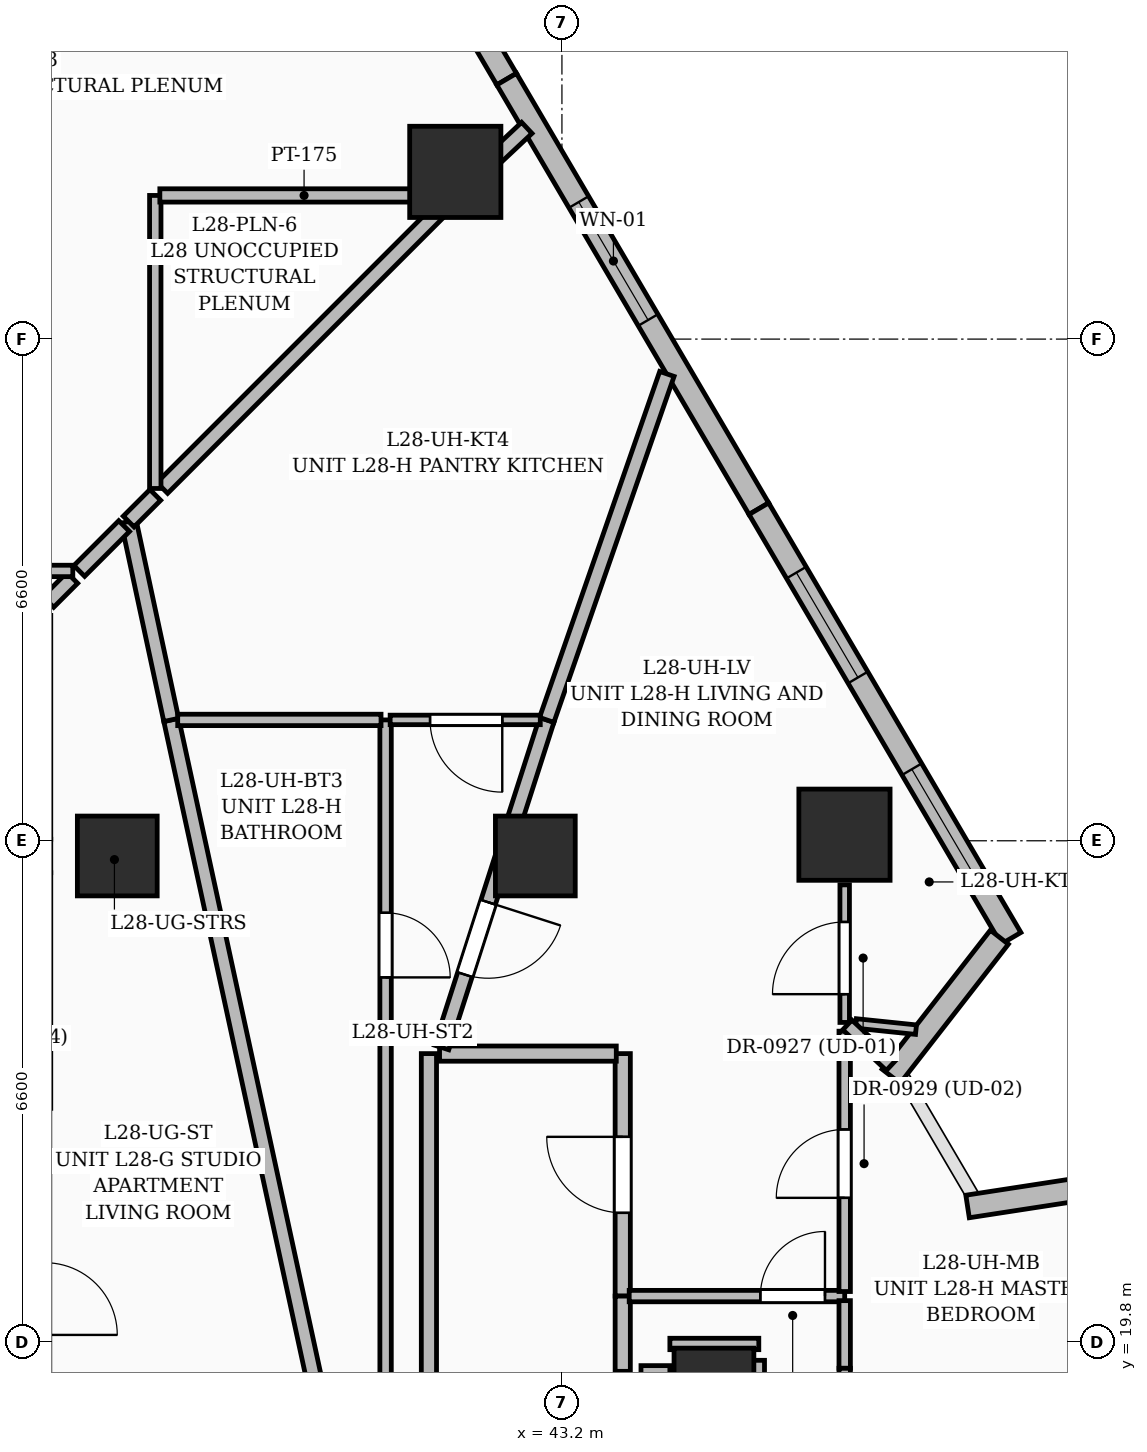
"""IFC4 building model, lengths in metres.
Left out: names, types, materials, properties, quantities, classifications, styles, units other than length and angle.
Written with IfcOpenShell. Run it as: python <this file> out.ifc"""

import sys

from ifc_helpers import new_model, si_unit, direction, frame, frame_2d, origin, origin_2d, place, context, subcontext, project, spatial, rectangle, extrude, element, fill, save


model = new_model("IFC4")
c1 = context("Model", 3, precision=1e-05, world=origin(), true_north=direction((0.0, 1.0)))
c2 = subcontext(c1, "Body", "Model", "MODEL_VIEW")
j1 = project(units=[si_unit("LENGTHUNIT", "METRE"), si_unit("PLANEANGLEUNIT", "RADIAN")], contexts=[c1])
p1 = place(None, origin())
s1 = spatial("IfcSite", under=j1, at=p1, CompositionType="ELEMENT")
p2 = place(p1, origin())
s2 = spatial("IfcBuilding", under=s1, at=p2, CompositionType="ELEMENT")
p3 = place(p2, frame((0.0, 0.0, 114.0)))
s3 = spatial("IfcBuildingStorey", under=s2, at=p3, CompositionType="ELEMENT", Elevation=114.0)
for number, where, z_axis, x_axis in (
    (1, (45.2, 19.2, 0.0), (0.0, 0.0, 1.0), (1.0, 0.0, 0.0)),
    (2, (42.85, 26.2, 0.0), (0.0, 0.0, 1.0), (1.0, 0.0, 0.0)),
    (3, (37.35, 26.2, 0.0), (0.0, 0.0, 1.0), (1.0, 0.0, 0.0)),
):
    element("IfcColumn", number, at=place(p3, frame(where, z_axis=z_axis, x_axis=x_axis)), inside=s3, PredefinedType="COLUMN", context=c2, shape_type="SweptSolid", body=[
        extrude(rectangle(XDim=1.05, YDim=1.05, at=origin_2d()), origin(), (0.0, 0.0, 1.0), 3.6),
    ])
for number, where, z_axis, x_axis in (
    (4, (46.917, 26.48, 0.0), (0.0, 0.0, 1.0), (1.0, 0.0, 0.0)),
    (5, (41.797, 35.2, 0.0), (0.0, 0.0, 1.0), (1.0, 0.0, 0.0)),
):
    element("IfcColumn", number, at=place(p3, frame(where, z_axis=z_axis, x_axis=x_axis)), inside=s3, PredefinedType="COLUMN", context=c2, shape_type="SweptSolid", body=[
        extrude(rectangle(XDim=1.2, YDim=1.2, at=origin_2d()), origin(), (0.0, 0.0, 1.0), 3.6),
    ])
p4 = place(p3, frame((39.443, 41.58, 0.0), z_axis=(0.0, 0.0, 1.0), x_axis=(0.506342397937, -0.862332520581, 0.0)))
e6 = element("IfcWall", 6, at=p4, inside=s3, PredefinedType="SOLIDWALL", context=c2, shape_type="SweptSolid", body=[
    extrude(rectangle(XDim=5.984, YDim=0.3, at=frame_2d((2.992, 0.0))), origin(), (0.0, 0.0, 1.0), 3.35),
])
p5 = place(p4, frame((2.28, 0.0, 0.55)))
e7 = element("IfcOpeningElement", 7, at=p5, cuts=e6, PredefinedType="OPENING", context=c2, shape_type="SweptSolid", body=[
    extrude(rectangle(XDim=2.1, YDim=2.4, at=frame_2d((1.05, 1.2))), frame((0.0, 0.16, 0.0), z_axis=(0.0, -1.0, 0.0), x_axis=(1.0, 0.0, 0.0)), (0.0, 0.0, 1.0), 0.32),
])
p6 = place(p3, frame((42.472, 36.42, 0.0), z_axis=(0.0, 0.0, 1.0), x_axis=(0.506315009763, -0.86234860172, 0.0)))
e8 = element("IfcWall", 8, at=p6, inside=s3, PredefinedType="SOLIDWALL", context=c2, shape_type="SweptSolid", body=[
    extrude(rectangle(XDim=6.553, YDim=0.3, at=frame_2d((3.277, 0.0))), origin(), (0.0, 0.0, 1.0), 3.35),
])
p7 = place(p6, frame((1.875, 0.0, 0.6)))
e9 = element("IfcOpeningElement", 9, at=p7, cuts=e8, PredefinedType="OPENING", context=c2, shape_type="SweptSolid", body=[
    extrude(rectangle(XDim=1.8, YDim=2.1, at=frame_2d((0.9, 1.05))), frame((0.0, 0.16, 0.0), z_axis=(0.0, -1.0, 0.0), x_axis=(1.0, 0.0, 0.0)), (0.0, 0.0, 1.0), 0.32),
])
p8 = place(p3, frame((45.791, 30.769, 0.0), z_axis=(0.0, 0.0, 1.0), x_axis=(0.506326446954, -0.862341886443, 0.0)))
e10 = element("IfcWall", 10, at=p8, inside=s3, PredefinedType="SOLIDWALL", context=c2, shape_type="SweptSolid", body=[
    extrude(rectangle(XDim=6.554, YDim=0.3, at=frame_2d((3.277, 0.0))), origin(), (0.0, 0.0, 1.0), 3.35),
])
p9 = place(p8, frame((0.975, 0.0, 0.55)))
e11 = element("IfcOpeningElement", 11, at=p9, cuts=e10, PredefinedType="OPENING", context=c2, shape_type="SweptSolid", body=[
    extrude(rectangle(XDim=1.6, YDim=2.2, at=frame_2d((0.8, 1.1))), frame((0.0, 0.16, 0.0), z_axis=(0.0, -1.0, 0.0), x_axis=(1.0, 0.0, 0.0)), (0.0, 0.0, 1.0), 0.32),
])
p10 = place(p8, frame((3.975, 0.0, 0.55)))
e12 = element("IfcOpeningElement", 12, at=p10, cuts=e10, PredefinedType="OPENING", context=c2, shape_type="SweptSolid", body=[
    extrude(rectangle(XDim=1.6, YDim=2.2, at=frame_2d((0.8, 1.1))), frame((0.0, 0.16, 0.0), z_axis=(0.0, -1.0, 0.0), x_axis=(1.0, 0.0, 0.0)), (0.0, 0.0, 1.0), 0.32),
])
p11 = place(p3, frame((48.955, 25.132, 0.0), z_axis=(0.0, 0.0, 1.0), x_axis=(-0.614326980446, -0.789051557946, 0.0)))
e13 = element("IfcWall", 13, at=p11, inside=s3, PredefinedType="SOLIDWALL", context=c2, shape_type="SweptSolid", body=[
    extrude(rectangle(XDim=2.318, YDim=0.3, at=frame_2d((1.159, 0.0))), origin(), (0.0, 0.0, 1.0), 2.575),
])
p12 = place(p3, frame((48.537, 21.589, 0.0), z_axis=(0.0, 0.0, 1.0), x_axis=(0.988351014823, 0.152191561848, 0.0)))
e14 = element("IfcWall", 14, at=p12, inside=s3, PredefinedType="SOLIDWALL", context=c2, shape_type="SweptSolid", body=[
    extrude(rectangle(XDim=2.594, YDim=0.3, at=frame_2d((1.297, 0.0))), origin(), (0.0, 0.0, 1.0), 2.575),
])
p13 = place(p3, frame((44.0, 20.41, 0.0), z_axis=(0.0, 0.0, 1.0), x_axis=(0.0, 1.0, 0.0)))
e15 = element("IfcWall", 15, at=p13, inside=s3, PredefinedType="PARTITIONING", context=c2, shape_type="SweptSolid", body=[
    extrude(rectangle(XDim=3.19, YDim=0.2, at=frame_2d((1.595, 0.0))), origin(), (0.0, 0.0, 1.0), 2.436),
])
p14 = place(p13, frame((1.095, 0.0, 0.0)))
e16 = element("IfcOpeningElement", 16, at=p14, cuts=e15, PredefinedType="OPENING", context=c2, shape_type="SweptSolid", body=[
    extrude(rectangle(XDim=1.0, YDim=2.2, at=frame_2d((0.5, 1.1))), frame((0.0, 0.11, 0.0), z_axis=(0.0, -1.0, 0.0), x_axis=(1.0, 0.0, 0.0)), (0.0, 0.0, 1.0), 0.22),
])
p15 = place(p3, frame((43.915, 23.6, 0.0), z_axis=(0.0, 0.0, 1.0), x_axis=(-1.0, 0.0, 0.0)))
e17 = element("IfcWall", 17, at=p15, inside=s3, PredefinedType="PARTITIONING", context=c2, shape_type="SweptSolid", body=[
    extrude(rectangle(XDim=2.325, YDim=0.2, at=frame_2d((1.163, 0.0))), origin(), (0.0, 0.0, 1.0), 2.436),
])
p16 = place(p3, frame((44.0, 19.42, 0.0), z_axis=(0.0, 0.0, 1.0), x_axis=(0.0, 1.0, 0.0)))
e18 = element("IfcWall", 18, at=p16, inside=s3, PredefinedType="PARTITIONING", context=c2, shape_type="SweptSolid", body=[
    extrude(rectangle(XDim=0.99, YDim=0.2, at=frame_2d((0.495, 0.0))), origin(), (0.0, 0.0, 1.0), 3.35),
])
p17 = place(p3, frame((41.45, 23.6, 0.0), z_axis=(0.0, 0.0, 1.0), x_axis=(0.0, -1.0, 0.0)))
e19 = element("IfcWall", 19, at=p17, inside=s3, PredefinedType="PARTITIONING", context=c2, shape_type="SweptSolid", body=[
    extrude(rectangle(XDim=5.85, YDim=0.2, at=frame_2d((2.925, 0.0))), origin(), (0.0, 0.0, 1.0), 3.35),
])
p18 = place(p3, frame((40.262, 17.833, 0.0), z_axis=(0.0, 0.0, 1.0), x_axis=(-0.211865908249, 0.977298744971, 0.0)))
e20 = element("IfcWall", 20, at=p18, inside=s3, PredefinedType="PARTITIONING", context=c2, shape_type="SweptSolid", body=[
    extrude(rectangle(XDim=10.393, YDim=0.2, at=frame_2d((5.196, 0.0))), origin(), (0.0, 0.0, 1.0), 2.436),
])
p19 = place(p3, frame((38.06, 27.99, 0.0), z_axis=(0.0, 0.0, 1.0), x_axis=(-0.209797646084, 0.977744827497, 0.0)))
e21 = element("IfcWall", 21, at=p19, inside=s3, PredefinedType="PARTITIONING", context=c2, shape_type="SweptSolid", body=[
    extrude(rectangle(XDim=2.669, YDim=0.2, at=frame_2d((1.335, 0.0))), origin(), (0.0, 0.0, 1.0), 2.712),
])
p20 = place(p3, frame((37.44, 30.54, 0.0), z_axis=(0.0, 0.0, 1.0), x_axis=(-0.707106781187, -0.707106781187, 0.0)))
e22 = element("IfcWall", 22, at=p20, inside=s3, PredefinedType="PARTITIONING", context=c2, shape_type="SweptSolid", body=[
    extrude(rectangle(XDim=0.834, YDim=0.2, at=frame_2d((0.417, 0.0))), origin(), (0.0, 0.0, 1.0), 2.712),
])
p21 = place(p3, frame((36.758, 29.858, 0.0), z_axis=(0.0, 0.0, 1.0), x_axis=(-0.707106781187, -0.707106781187, 0.0)))
e23 = element("IfcWall", 23, at=p21, inside=s3, PredefinedType="PARTITIONING", context=c2, shape_type="SweptSolid", body=[
    extrude(rectangle(XDim=0.447, YDim=0.2, at=frame_2d((0.223, 0.0))), origin(), (0.0, 0.0, 1.0), 3.35),
])
p22 = place(p3, frame((44.085, 20.41, 0.0), z_axis=(0.0, 0.0, 1.0), x_axis=(1.0, 0.0, 0.0)))
e24 = element("IfcWall", 24, at=p22, inside=s3, PredefinedType="PARTITIONING", context=c2, shape_type="SweptSolid", body=[
    extrude(rectangle(XDim=2.835, YDim=0.15, at=frame_2d((1.417, 0.0))), origin(), (0.0, 0.0, 1.0), 2.372),
])
p23 = place(p22, frame((1.726, 0.0, 0.0)))
e25 = element("IfcOpeningElement", 25, at=p23, cuts=e24, PredefinedType="OPENING", context=c2, shape_type="SweptSolid", body=[
    extrude(rectangle(XDim=0.85, YDim=2.1, at=frame_2d((0.425, 1.05))), frame((0.0, 0.085, 0.0), z_axis=(0.0, -1.0, 0.0), x_axis=(1.0, 0.0, 0.0)), (0.0, 0.0, 1.0), 0.17),
])
p24 = place(p3, frame((46.92, 24.01, 0.0), z_axis=(0.0, 0.0, 1.0), x_axis=(0.0, 1.0, 0.0)))
e26 = element("IfcWall", 26, at=p24, inside=s3, PredefinedType="PARTITIONING", context=c2, shape_type="SweptSolid", body=[
    extrude(rectangle(XDim=1.81, YDim=0.125, at=frame_2d((0.905, 0.0))), origin(), (0.0, 0.0, 1.0), 2.372),
])
p25 = place(p24, frame((0.372, 0.0, 0.0)))
e27 = element("IfcOpeningElement", 27, at=p25, cuts=e26, PredefinedType="OPENING", context=c2, shape_type="SweptSolid", body=[
    extrude(rectangle(XDim=0.95, YDim=2.2, at=frame_2d((0.475, 1.1))), frame((0.0, 0.072, 0.0), z_axis=(0.0, -1.0, 0.0), x_axis=(1.0, 0.0, 0.0)), (0.0, 0.0, 1.0), 0.145),
])
p26 = place(p3, frame((46.92, 20.47, 0.0), z_axis=(0.0, 0.0, 1.0), x_axis=(0.0, 1.0, 0.0)))
e28 = element("IfcWall", 28, at=p26, inside=s3, PredefinedType="PARTITIONING", context=c2, shape_type="SweptSolid", body=[
    extrude(rectangle(XDim=3.425, YDim=0.15, at=frame_2d((1.712, 0.0))), origin(), (0.0, 0.0, 1.0), 2.712),
])
p27 = place(p26, frame((1.232, 0.0, 0.0)))
e29 = element("IfcOpeningElement", 29, at=p27, cuts=e28, PredefinedType="OPENING", context=c2, shape_type="SweptSolid", body=[
    extrude(rectangle(XDim=0.9, YDim=2.15, at=frame_2d((0.45, 1.075))), frame((0.0, 0.085, 0.0), z_axis=(0.0, -1.0, 0.0), x_axis=(1.0, 0.0, 0.0)), (0.0, 0.0, 1.0), 0.17),
])
p28 = place(p3, frame((43.0, 27.99, 0.0), z_axis=(0.0, 0.0, 1.0), x_axis=(-0.305803129518, -0.95209476733, 0.0)))
e30 = element("IfcWall", 30, at=p28, inside=s3, PredefinedType="PARTITIONING", context=c2, shape_type="SweptSolid", body=[
    extrude(rectangle(XDim=4.526, YDim=0.2, at=frame_2d((2.263, 0.0))), origin(), (0.0, 0.0, 1.0), 2.372),
])
p29 = place(p28, frame((2.519, 0.0, 0.0)))
e31 = element("IfcOpeningElement", 31, at=p29, cuts=e30, PredefinedType="OPENING", context=c2, shape_type="SweptSolid", body=[
    extrude(rectangle(XDim=1.0, YDim=2.2, at=frame_2d((0.5, 1.1))), frame((0.0, 0.11, 0.0), z_axis=(0.0, -1.0, 0.0), x_axis=(1.0, 0.0, 0.0)), (0.0, 0.0, 1.0), 0.22),
])
p30 = place(p3, frame((44.581, 32.542, 0.0), z_axis=(0.0, 0.0, 1.0), x_axis=(-0.328103998337, -0.944641607318, 0.0)))
e32 = element("IfcWall", 32, at=p30, inside=s3, PredefinedType="PARTITIONING", context=c2, shape_type="SweptSolid", body=[
    extrude(rectangle(XDim=4.819, YDim=0.2, at=frame_2d((2.409, 0.0))), origin(), (0.0, 0.0, 1.0), 2.57),
])
p31 = place(p3, frame((46.92, 19.46, 0.0), z_axis=(0.0, 0.0, 1.0), x_axis=(0.0, 1.0, 0.0)))
e33 = element("IfcWall", 33, at=p31, inside=s3, PredefinedType="PARTITIONING", context=c2, shape_type="SweptSolid", body=[
    extrude(rectangle(XDim=0.89, YDim=0.15, at=frame_2d((0.445, 0.0))), origin(), (0.0, 0.0, 1.0), 3.35),
])
p32 = place(p3, frame((47.067, 23.997, 0.0), z_axis=(0.0, 0.0, 1.0), x_axis=(0.99466575773, -0.103150523024, 0.0)))
e34 = element("IfcWall", 34, at=p32, inside=s3, PredefinedType="PARTITIONING", context=c2, shape_type="SweptSolid", body=[
    extrude(rectangle(XDim=0.795, YDim=0.125, at=frame_2d((0.397, 0.0))), origin(), (0.0, 0.0, 1.0), 3.35),
])
p33 = place(p3, frame((40.88, 27.99, 0.0), z_axis=(0.0, 0.0, 1.0), x_axis=(0.0, -1.0, 0.0)))
e35 = element("IfcWall", 35, at=p33, inside=s3, PredefinedType="PARTITIONING", context=c2, shape_type="SweptSolid", body=[
    extrude(rectangle(XDim=10.155, YDim=0.15, at=frame_2d((5.078, 0.0))), origin(), (0.0, 0.0, 1.0), 2.436),
])
p34 = place(p33, frame((2.537, 0.0, 0.0)))
e36 = element("IfcOpeningElement", 36, at=p34, cuts=e35, PredefinedType="OPENING", context=c2, shape_type="SweptSolid", body=[
    extrude(rectangle(XDim=0.85, YDim=2.1, at=frame_2d((0.425, 1.05))), frame((0.0, 0.085, 0.0), z_axis=(0.0, -1.0, 0.0), x_axis=(1.0, 0.0, 0.0)), (0.0, 0.0, 1.0), 0.17),
])
p35 = place(p3, frame((42.915, 27.99, 0.0), z_axis=(0.0, 0.0, 1.0), x_axis=(-1.0, 0.0, 0.0)))
e37 = element("IfcWall", 37, at=p35, inside=s3, PredefinedType="PARTITIONING", context=c2, shape_type="SweptSolid", body=[
    extrude(rectangle(XDim=1.975, YDim=0.125, at=frame_2d((0.988, 0.0))), origin(), (0.0, 0.0, 1.0), 2.372),
])
p36 = place(p35, frame((0.5, 0.0, 0.0)))
e38 = element("IfcOpeningElement", 38, at=p36, cuts=e37, PredefinedType="OPENING", context=c2, shape_type="SweptSolid", body=[
    extrude(rectangle(XDim=0.95, YDim=2.2, at=frame_2d((0.475, 1.1))), frame((0.0, 0.072, 0.0), z_axis=(0.0, -1.0, 0.0), x_axis=(1.0, 0.0, 0.0)), (0.0, 0.0, 1.0), 0.145),
])
p37 = place(p3, frame((40.82, 27.99, 0.0), z_axis=(0.0, 0.0, 1.0), x_axis=(-1.0, 0.0, 0.0)))
e39 = element("IfcWall", 39, at=p37, inside=s3, PredefinedType="PARTITIONING", context=c2, shape_type="SweptSolid", body=[
    extrude(rectangle(XDim=2.675, YDim=0.15, at=frame_2d((1.337, 0.0))), origin(), (0.0, 0.0, 1.0), 3.35),
])
p38 = place(p3, frame((37.85, 30.95, 0.0), z_axis=(0.0, 0.0, 1.0), x_axis=(-0.707353374636, -0.706860101711, 0.0)))
e40 = element("IfcWall", 40, at=p38, inside=s3, PredefinedType="PARTITIONING", context=c2, shape_type="SweptSolid", body=[
    extrude(rectangle(XDim=0.495, YDim=0.2, at=frame_2d((0.248, 0.0))), origin(), (0.0, 0.0, 1.0), 2.712),
])
p39 = place(p3, frame((42.738, 35.779, 0.0), z_axis=(0.0, 0.0, 1.0), x_axis=(-0.729379024936, -0.684109814272, 0.0)))
e41 = element("IfcWall", 41, at=p39, inside=s3, PredefinedType="PARTITIONING", context=c2, shape_type="SweptSolid", body=[
    extrude(rectangle(XDim=1.3, YDim=0.2, at=frame_2d((0.65, 0.0))), origin(), (0.0, 0.0, 1.0), 3.35),
])
p40 = place(p3, frame((41.684, 34.784, 0.0), z_axis=(0.0, 0.0, 1.0), x_axis=(-0.707106781187, -0.707106781187, 0.0)))
e42 = element("IfcWall", 42, at=p40, inside=s3, PredefinedType="PARTITIONING", context=c2, shape_type="SweptSolid", body=[
    extrude(rectangle(XDim=5.292, YDim=0.2, at=frame_2d((2.646, 0.0))), origin(), (0.0, 0.0, 1.0), 2.712),
])
p41 = place(p3, frame((33.485, 29.95, 0.0), z_axis=(0.0, 0.0, 1.0), x_axis=(1.0, 0.0, 0.0)))
e43 = element("IfcWall", 43, at=p41, inside=s3, PredefinedType="PARTITIONING", context=c2, shape_type="SweptSolid", body=[
    extrude(rectangle(XDim=3.28, YDim=0.15, at=frame_2d((1.64, 0.0))), origin(), (0.0, 0.0, 1.0), 2.372),
])
p42 = place(p3, frame((37.85, 31.035, 0.0), z_axis=(0.0, 0.0, 1.0), x_axis=(0.0, 1.0, 0.0)))
e44 = element("IfcWall", 44, at=p42, inside=s3, PredefinedType="PARTITIONING", context=c2, shape_type="SweptSolid", body=[
    extrude(rectangle(XDim=3.855, YDim=0.15, at=frame_2d((1.927, 0.0))), origin(), (0.0, 0.0, 1.0), 2.712),
])
p43 = place(p3, frame((37.91, 34.89, 0.0), z_axis=(0.0, 0.0, 1.0), x_axis=(1.0, 0.0, 0.0)))
e45 = element("IfcWall", 45, at=p43, inside=s3, PredefinedType="PARTITIONING", context=c2, shape_type="SweptSolid", body=[
    extrude(rectangle(XDim=3.795, YDim=0.175, at=frame_2d((1.897, 0.0))), origin(), (0.0, 0.0, 1.0), 2.57),
])
p44 = place(p3, frame((47.528, 23.443, 0.0), z_axis=(0.0, 0.0, 1.0), x_axis=(-0.731583247314, 0.681752119358, 0.0)))
e46 = element("IfcWall", 46, at=p44, inside=s3, PredefinedType="PARTITIONING", context=c2, shape_type="SweptSolid", body=[
    extrude(rectangle(XDim=0.784, YDim=0.175, at=frame_2d((0.392, 0.0))), origin(), (0.0, 0.0, 1.0), 3.35),
])
p45 = place(p3, frame((44.24, 19.42, 0.0), z_axis=(0.0, 0.0, 1.0), x_axis=(1.0, 0.0, 0.0)))
e47 = element("IfcWall", 47, at=p45, inside=s3, PredefinedType="PARTITIONING", context=c2, shape_type="SweptSolid", body=[
    extrude(rectangle(XDim=0.38, YDim=0.15, at=frame_2d((0.19, 0.0))), origin(), (0.0, 0.0, 1.0), 3.35),
])
p46 = place(p3, frame((44.62, 19.78, 0.0), z_axis=(0.0, 0.0, 1.0), x_axis=(1.0, 0.0, 0.0)))
e48 = element("IfcWall", 48, at=p46, inside=s3, PredefinedType="PARTITIONING", context=c2, shape_type="SweptSolid", body=[
    extrude(rectangle(XDim=1.17, YDim=0.15, at=frame_2d((0.585, 0.0))), origin(), (0.0, 0.0, 1.0), 2.372),
])
p47 = place(p3, frame((45.79, 19.565, 0.0), z_axis=(0.0, 0.0, 1.0), x_axis=(0.0, -1.0, 0.0)))
e49 = element("IfcWall", 49, at=p47, inside=s3, PredefinedType="PARTITIONING", context=c2, shape_type="SweptSolid", body=[
    extrude(rectangle(XDim=0.945, YDim=0.15, at=frame_2d((0.472, 0.0))), origin(), (0.0, 0.0, 1.0), 3.35),
])
p48 = place(p3, frame((46.92, 17.99, 0.0), z_axis=(0.0, 0.0, 1.0), x_axis=(0.0, 1.0, 0.0)))
e50 = element("IfcWall", 50, at=p48, inside=s3, PredefinedType="PARTITIONING", context=c2, shape_type="SweptSolid", body=[
    extrude(rectangle(XDim=1.47, YDim=0.15, at=frame_2d((0.735, 0.0))), origin(), (0.0, 0.0, 1.0), 3.35),
])
p49 = place(p7, origin())
e51 = element("IfcWindow", 51, at=p49, inside=s3, PartitioningType="SINGLE_PANEL", PredefinedType="WINDOW", context=c2, shape_type="SweptSolid", body=[
    extrude(rectangle(XDim=1.8, YDim=2.1, at=frame_2d((0.9, 1.05))), frame((0.0, 0.03, 0.0), z_axis=(0.0, -1.0, 0.0), x_axis=(1.0, 0.0, 0.0)), (0.0, 0.0, 1.0), 0.06),
])
fill(e9, e51)
p50 = place(p9, origin())
e52 = element("IfcWindow", 52, at=p50, inside=s3, PartitioningType="SINGLE_PANEL", PredefinedType="WINDOW", context=c2, shape_type="SweptSolid", body=[
    extrude(rectangle(XDim=1.6, YDim=2.2, at=frame_2d((0.8, 1.1))), frame((0.0, 0.03, 0.0), z_axis=(0.0, -1.0, 0.0), x_axis=(1.0, 0.0, 0.0)), (0.0, 0.0, 1.0), 0.06),
])
fill(e11, e52)
p51 = place(p10, origin())
e53 = element("IfcWindow", 53, at=p51, inside=s3, PartitioningType="SINGLE_PANEL", PredefinedType="WINDOW", context=c2, shape_type="SweptSolid", body=[
    extrude(rectangle(XDim=1.6, YDim=2.2, at=frame_2d((0.8, 1.1))), frame((0.0, 0.03, 0.0), z_axis=(0.0, -1.0, 0.0), x_axis=(1.0, 0.0, 0.0)), (0.0, 0.0, 1.0), 0.06),
])
fill(e12, e53)
p52 = place(p14, origin())
e54 = element("IfcDoor", 54, at=p52, inside=s3, OperationType="SINGLE_SWING_RIGHT", PredefinedType="DOOR", context=c2, shape_type="SweptSolid", body=[
    extrude(rectangle(XDim=1.0, YDim=2.2, at=frame_2d((0.5, 1.1))), frame((0.0, 0.025, 0.0), z_axis=(0.0, -1.0, 0.0), x_axis=(1.0, 0.0, 0.0)), (0.0, 0.0, 1.0), 0.05),
])
fill(e16, e54)
p53 = place(p25, origin())
e55 = element("IfcDoor", 55, at=p53, inside=s3, OperationType="SINGLE_SWING_LEFT", PredefinedType="DOOR", context=c2, shape_type="SweptSolid", body=[
    extrude(rectangle(XDim=0.95, YDim=2.2, at=frame_2d((0.475, 1.1))), frame((0.0, 0.025, 0.0), z_axis=(0.0, -1.0, 0.0), x_axis=(1.0, 0.0, 0.0)), (0.0, 0.0, 1.0), 0.05),
])
fill(e27, e55)
p54 = place(p23, origin())
e56 = element("IfcDoor", 56, at=p54, inside=s3, OperationType="SINGLE_SWING_RIGHT", PredefinedType="DOOR", context=c2, shape_type="SweptSolid", body=[
    extrude(rectangle(XDim=0.85, YDim=2.1, at=frame_2d((0.425, 1.05))), frame((0.0, 0.025, 0.0), z_axis=(0.0, -1.0, 0.0), x_axis=(1.0, 0.0, 0.0)), (0.0, 0.0, 1.0), 0.05),
])
fill(e25, e56)
p55 = place(p27, origin())
e57 = element("IfcDoor", 57, at=p55, inside=s3, OperationType="SINGLE_SWING_LEFT", PredefinedType="DOOR", context=c2, shape_type="SweptSolid", body=[
    extrude(rectangle(XDim=0.9, YDim=2.15, at=frame_2d((0.45, 1.075))), frame((0.0, 0.025, 0.0), z_axis=(0.0, -1.0, 0.0), x_axis=(1.0, 0.0, 0.0)), (0.0, 0.0, 1.0), 0.05),
])
fill(e29, e57)
p56 = place(p36, origin())
e58 = element("IfcDoor", 58, at=p56, inside=s3, OperationType="SINGLE_SWING_LEFT", PredefinedType="DOOR", context=c2, shape_type="SweptSolid", body=[
    extrude(rectangle(XDim=0.95, YDim=2.2, at=frame_2d((0.475, 1.1))), frame((0.0, 0.025, 0.0), z_axis=(0.0, -1.0, 0.0), x_axis=(1.0, 0.0, 0.0)), (0.0, 0.0, 1.0), 0.05),
])
fill(e38, e58)
p57 = place(p34, origin())
e59 = element("IfcDoor", 59, at=p57, inside=s3, OperationType="SINGLE_SWING_RIGHT", PredefinedType="DOOR", context=c2, shape_type="SweptSolid", body=[
    extrude(rectangle(XDim=0.85, YDim=2.1, at=frame_2d((0.425, 1.05))), frame((0.0, 0.025, 0.0), z_axis=(0.0, -1.0, 0.0), x_axis=(1.0, 0.0, 0.0)), (0.0, 0.0, 1.0), 0.05),
])
fill(e36, e59)
p58 = place(p29, origin())
e60 = element("IfcDoor", 60, at=p58, inside=s3, OperationType="SINGLE_SWING_LEFT", PredefinedType="DOOR", context=c2, shape_type="SweptSolid", body=[
    extrude(rectangle(XDim=1.0, YDim=2.2, at=frame_2d((0.5, 1.1))), frame((0.0, 0.025, 0.0), z_axis=(0.0, -1.0, 0.0), x_axis=(1.0, 0.0, 0.0)), (0.0, 0.0, 1.0), 0.05),
])
fill(e31, e60)
save(model, sys.argv[1])
